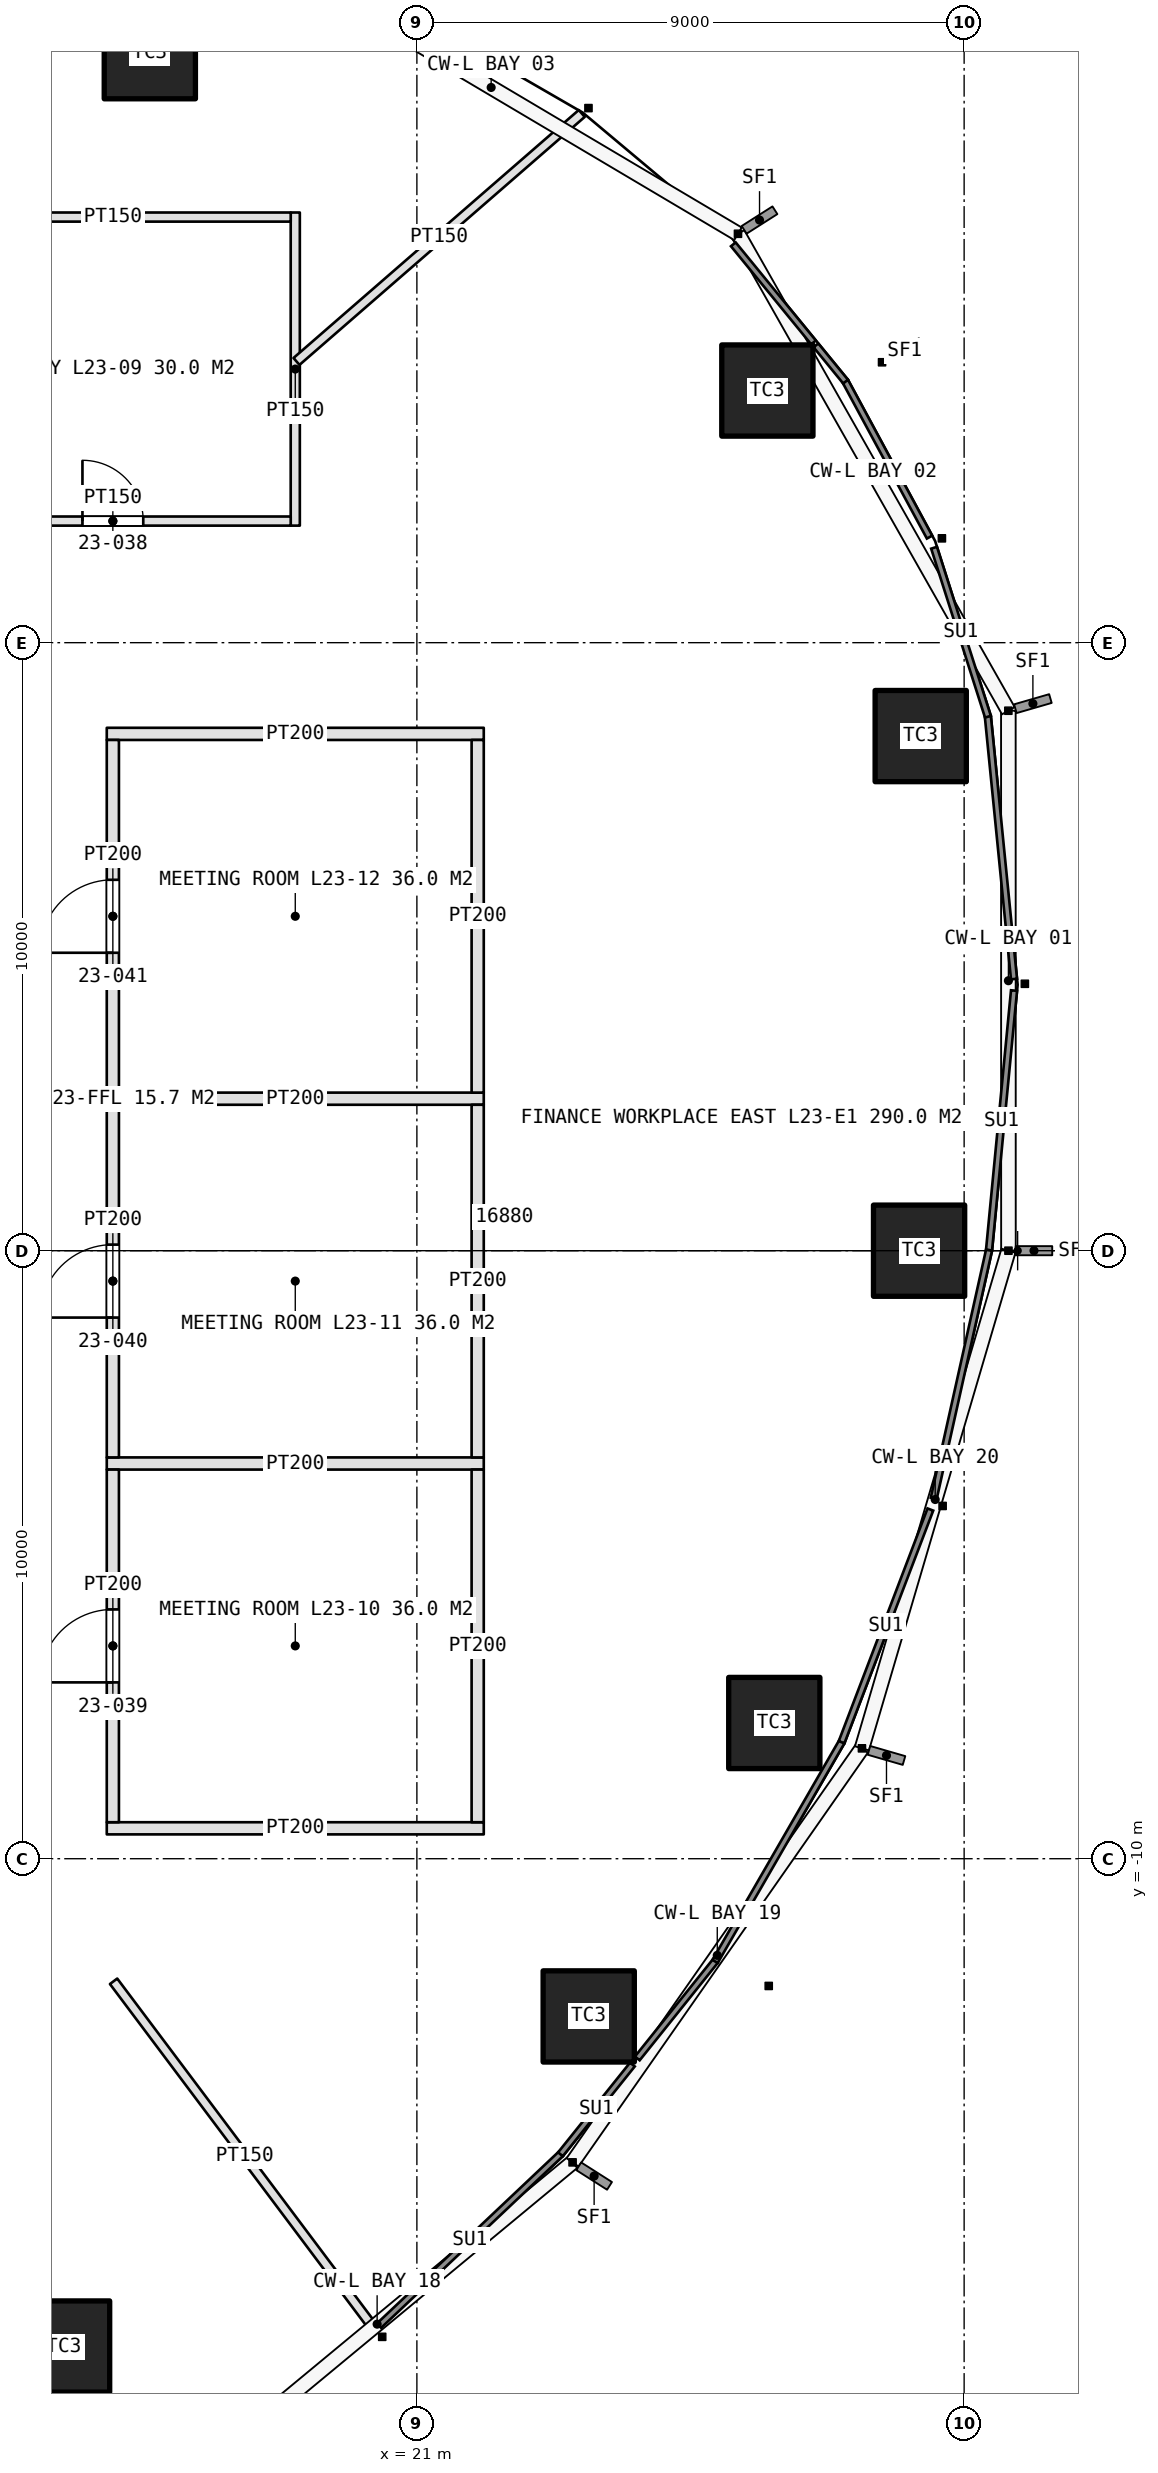
"""IFC4 building model, lengths in metres.
Left out: names, types, materials, properties, quantities, classifications, styles, units other than length and angle.
Written with IfcOpenShell. Run it as: python <this file> out.ifc"""

import sys

from ifc_helpers import new_model, si_unit, direction, frame, frame_2d, origin, origin_2d, place, context, subcontext, project, spatial, rectangle, extrude, element, fill, save


model = new_model("IFC4")
c1 = context("Model", 3, precision=1e-05, world=origin(), true_north=direction((0.0, 1.0)))
c2 = subcontext(c1, "Body", "Model", "MODEL_VIEW")
j1 = project(units=[si_unit("LENGTHUNIT", "METRE"), si_unit("PLANEANGLEUNIT", "RADIAN")], contexts=[c1])
p1 = place(None, origin())
s1 = spatial("IfcSite", under=j1, at=p1, CompositionType="ELEMENT")
p2 = place(p1, origin())
s2 = spatial("IfcBuilding", under=s1, at=p2, CompositionType="ELEMENT")
p3 = place(p2, frame((0.0, 0.0, 113.4)))
s3 = spatial("IfcBuildingStorey", under=s2, at=p3, CompositionType="ELEMENT", Elevation=113.4)
for number, where, z_axis, x_axis in (
    (1, (29.259, 0.0, 0.0), (0.0, 0.0, 1.0), (1.0, 0.0, 0.0)),
    (2, (29.286, 8.464, 0.0), (0.0, 0.0, 1.0), (1.0, 0.0, 0.0)),
    (3, (26.764, 14.147, 0.0), (0.0, 0.0, 1.0), (1.0, 0.0, 0.0)),
    (4, (16.608, 19.695, 0.0), (0.0, 0.0, 1.0), (1.0, 0.0, 0.0)),
    (5, (15.198, -18.023, 0.0), (0.0, 0.0, 1.0), (1.0, 0.0, 0.0)),
    (6, (23.826, -12.594, 0.0), (0.0, 0.0, 1.0), (1.0, 0.0, 0.0)),
    (7, (26.878, -7.768, 0.0), (0.0, 0.0, 1.0), (1.0, 0.0, 0.0)),
):
    element("IfcColumn", number, at=place(p3, frame(where, z_axis=z_axis, x_axis=x_axis)), inside=s3, PredefinedType="COLUMN", context=c2, shape_type="SweptSolid", body=[
        extrude(rectangle(XDim=1.5, YDim=1.5, at=origin_2d()), origin(), (0.0, 0.0, 1.0), 4.2),
    ])
p4 = place(p3, frame((19.0, 11.925, 0.0), z_axis=(0.0, 0.0, 1.0), x_axis=(0.0, 1.0, 0.0)))
e8 = element("IfcWall", 8, at=p4, inside=s3, PredefinedType="PARTITIONING", context=c2, shape_type="SweptSolid", body=[
    extrude(rectangle(XDim=5.15, YDim=0.15, at=frame_2d((2.575, 0.0))), origin(), (0.0, 0.0, 1.0), 3.0),
])
p5 = place(p3, frame((13.075, 12.0, 0.0), z_axis=(0.0, 0.0, 1.0), x_axis=(1.0, 0.0, 0.0)))
e9 = element("IfcWall", 9, at=p5, inside=s3, PredefinedType="PARTITIONING", context=c2, shape_type="SweptSolid", body=[
    extrude(rectangle(XDim=5.85, YDim=0.15, at=frame_2d((2.925, 0.0))), origin(), (0.0, 0.0, 1.0), 3.0),
])
p6 = place(p5, frame((2.425, 0.0, 0.0)))
e10 = element("IfcOpeningElement", 10, at=p6, cuts=e9, PredefinedType="OPENING", context=c2, shape_type="SweptSolid", body=[
    extrude(rectangle(XDim=1.0, YDim=2.2, at=frame_2d((0.5, 1.1))), frame((0.0, 0.085, 0.0), z_axis=(0.0, -1.0, 0.0), x_axis=(1.0, 0.0, 0.0)), (0.0, 0.0, 1.0), 0.17),
])
p7 = place(p3, frame((13.075, 17.0, 0.0), z_axis=(0.0, 0.0, 1.0), x_axis=(1.0, 0.0, 0.0)))
e11 = element("IfcWall", 11, at=p7, inside=s3, PredefinedType="PARTITIONING", context=c2, shape_type="SweptSolid", body=[
    extrude(rectangle(XDim=5.85, YDim=0.15, at=frame_2d((2.925, 0.0))), origin(), (0.0, 0.0, 1.0), 3.0),
])
for number, where, z_axis, x_axis in (
    (12, (15.9, -9.5, 0.0), (0.0, 0.0, 1.0), (1.0, 0.0, 0.0)),
    (13, (15.9, -3.5, 0.0), (0.0, 0.0, 1.0), (1.0, 0.0, 0.0)),
    (14, (15.9, 2.5, 0.0), (0.0, 0.0, 1.0), (1.0, 0.0, 0.0)),
    (15, (15.9, 8.5, 0.0), (0.0, 0.0, 1.0), (1.0, 0.0, 0.0)),
):
    element("IfcWall", number, at=place(p3, frame(where, z_axis=z_axis, x_axis=x_axis)), inside=s3, PredefinedType="PARTITIONING", context=c2, shape_type="SweptSolid", body=[
        extrude(rectangle(XDim=6.2, YDim=0.2, at=frame_2d((3.1, 0.0))), origin(), (0.0, 0.0, 1.0), 3.0),
    ])
p8 = place(p3, frame((16.0, -9.4, 0.0), z_axis=(0.0, 0.0, 1.0), x_axis=(0.0, 1.0, 0.0)))
e16 = element("IfcWall", 16, at=p8, inside=s3, PredefinedType="PARTITIONING", context=c2, shape_type="SweptSolid", body=[
    extrude(rectangle(XDim=5.8, YDim=0.2, at=frame_2d((2.9, 0.0))), origin(), (0.0, 0.0, 1.0), 3.0),
])
p9 = place(p8, frame((2.3, 0.0, 0.0)))
e17 = element("IfcOpeningElement", 17, at=p9, cuts=e16, PredefinedType="OPENING", context=c2, shape_type="SweptSolid", body=[
    extrude(rectangle(XDim=1.2, YDim=2.4, at=frame_2d((0.6, 1.2))), frame((0.0, 0.11, 0.0), z_axis=(0.0, -1.0, 0.0), x_axis=(1.0, 0.0, 0.0)), (0.0, 0.0, 1.0), 0.22),
])
p10 = place(p3, frame((22.0, -9.4, 0.0), z_axis=(0.0, 0.0, 1.0), x_axis=(0.0, 1.0, 0.0)))
e18 = element("IfcWall", 18, at=p10, inside=s3, PredefinedType="PARTITIONING", context=c2, shape_type="SweptSolid", body=[
    extrude(rectangle(XDim=5.8, YDim=0.2, at=frame_2d((2.9, 0.0))), origin(), (0.0, 0.0, 1.0), 3.0),
])
p11 = place(p3, frame((16.0, -3.4, 0.0), z_axis=(0.0, 0.0, 1.0), x_axis=(0.0, 1.0, 0.0)))
e19 = element("IfcWall", 19, at=p11, inside=s3, PredefinedType="PARTITIONING", context=c2, shape_type="SweptSolid", body=[
    extrude(rectangle(XDim=5.8, YDim=0.2, at=frame_2d((2.9, 0.0))), origin(), (0.0, 0.0, 1.0), 3.0),
])
p12 = place(p11, frame((2.3, 0.0, 0.0)))
e20 = element("IfcOpeningElement", 20, at=p12, cuts=e19, PredefinedType="OPENING", context=c2, shape_type="SweptSolid", body=[
    extrude(rectangle(XDim=1.2, YDim=2.4, at=frame_2d((0.6, 1.2))), frame((0.0, 0.11, 0.0), z_axis=(0.0, -1.0, 0.0), x_axis=(1.0, 0.0, 0.0)), (0.0, 0.0, 1.0), 0.22),
])
p13 = place(p3, frame((22.0, -3.4, 0.0), z_axis=(0.0, 0.0, 1.0), x_axis=(0.0, 1.0, 0.0)))
e21 = element("IfcWall", 21, at=p13, inside=s3, PredefinedType="PARTITIONING", context=c2, shape_type="SweptSolid", body=[
    extrude(rectangle(XDim=5.8, YDim=0.2, at=frame_2d((2.9, 0.0))), origin(), (0.0, 0.0, 1.0), 3.0),
])
p14 = place(p3, frame((16.0, 2.6, 0.0), z_axis=(0.0, 0.0, 1.0), x_axis=(0.0, 1.0, 0.0)))
e22 = element("IfcWall", 22, at=p14, inside=s3, PredefinedType="PARTITIONING", context=c2, shape_type="SweptSolid", body=[
    extrude(rectangle(XDim=5.8, YDim=0.2, at=frame_2d((2.9, 0.0))), origin(), (0.0, 0.0, 1.0), 3.0),
])
p15 = place(p14, frame((2.3, 0.0, 0.0)))
e23 = element("IfcOpeningElement", 23, at=p15, cuts=e22, PredefinedType="OPENING", context=c2, shape_type="SweptSolid", body=[
    extrude(rectangle(XDim=1.2, YDim=2.4, at=frame_2d((0.6, 1.2))), frame((0.0, 0.11, 0.0), z_axis=(0.0, -1.0, 0.0), x_axis=(1.0, 0.0, 0.0)), (0.0, 0.0, 1.0), 0.22),
])
p16 = place(p3, frame((22.0, 2.6, 0.0), z_axis=(0.0, 0.0, 1.0), x_axis=(0.0, 1.0, 0.0)))
e24 = element("IfcWall", 24, at=p16, inside=s3, PredefinedType="PARTITIONING", context=c2, shape_type="SweptSolid", body=[
    extrude(rectangle(XDim=5.8, YDim=0.2, at=frame_2d((2.9, 0.0))), origin(), (0.0, 0.0, 1.0), 3.0),
])
p17 = place(p3, frame((16.012, -12.016, 0.0), z_axis=(0.0, 0.0, 1.0), x_axis=(0.600059749679, -0.799955184254, 0.0)))
e25 = element("IfcWall", 25, at=p17, inside=s3, PredefinedType="PARTITIONING", context=c2, shape_type="SweptSolid", body=[
    extrude(rectangle(XDim=7.191, YDim=0.15, at=frame_2d((3.596, 0.0))), origin(), (0.0, 0.0, 1.0), 3.0),
])
p18 = place(p3, frame((19.02, 14.625, 0.0), z_axis=(0.0, 0.0, 1.0), x_axis=(0.754691753605, 0.656079535605, 0.0)))
e26 = element("IfcWall", 26, at=p18, inside=s3, PredefinedType="PARTITIONING", context=c2, shape_type="SweptSolid", body=[
    extrude(rectangle(XDim=6.217, YDim=0.15, at=frame_2d((3.108, 0.0))), origin(), (0.0, 0.0, 1.0), 3.0),
])
p19 = place(p6, origin())
e27 = element("IfcDoor", 27, at=p19, inside=s3, OperationType="SINGLE_SWING_LEFT", PredefinedType="DOOR", context=c2, shape_type="SweptSolid", body=[
    extrude(rectangle(XDim=1.0, YDim=2.2, at=frame_2d((0.5, 1.1))), frame((0.0, 0.025, 0.0), z_axis=(0.0, -1.0, 0.0), x_axis=(1.0, 0.0, 0.0)), (0.0, 0.0, 1.0), 0.05),
])
fill(e10, e27)
p20 = place(p9, origin())
e28 = element("IfcDoor", 28, at=p20, inside=s3, OperationType="SINGLE_SWING_LEFT", PredefinedType="DOOR", context=c2, shape_type="SweptSolid", body=[
    extrude(rectangle(XDim=1.2, YDim=2.4, at=frame_2d((0.6, 1.2))), frame((0.0, 0.025, 0.0), z_axis=(0.0, -1.0, 0.0), x_axis=(1.0, 0.0, 0.0)), (0.0, 0.0, 1.0), 0.05),
])
fill(e17, e28)
p21 = place(p12, origin())
e29 = element("IfcDoor", 29, at=p21, inside=s3, OperationType="SINGLE_SWING_LEFT", PredefinedType="DOOR", context=c2, shape_type="SweptSolid", body=[
    extrude(rectangle(XDim=1.2, YDim=2.4, at=frame_2d((0.6, 1.2))), frame((0.0, 0.025, 0.0), z_axis=(0.0, -1.0, 0.0), x_axis=(1.0, 0.0, 0.0)), (0.0, 0.0, 1.0), 0.05),
])
fill(e20, e29)
p22 = place(p15, origin())
e30 = element("IfcDoor", 30, at=p22, inside=s3, OperationType="SINGLE_SWING_LEFT", PredefinedType="DOOR", context=c2, shape_type="SweptSolid", body=[
    extrude(rectangle(XDim=1.2, YDim=2.4, at=frame_2d((0.6, 1.2))), frame((0.0, 0.025, 0.0), z_axis=(0.0, -1.0, 0.0), x_axis=(1.0, 0.0, 0.0)), (0.0, 0.0, 1.0), 0.05),
])
fill(e23, e30)
save(model, sys.argv[1])
